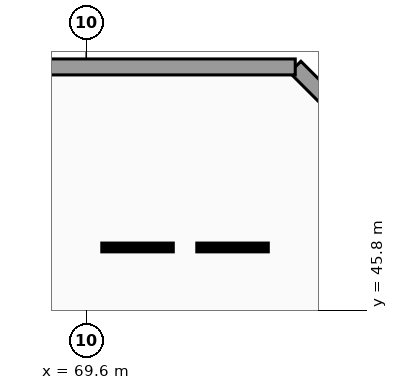
"""IFC4 building model, lengths in metres.
Left out: names, types, materials, properties, quantities, classifications, styles, units other than length and angle.
Written with IfcOpenShell. Run it as: python <this file> out.ifc"""

import sys

from ifc_helpers import new_model, si_unit, direction, frame, frame_2d, origin, place, context, subcontext, project, spatial, rectangle, extrude, element, save


model = new_model("IFC4")
c1 = context("Model", 3, precision=1e-05, world=origin(), true_north=direction((0.0, 1.0)))
c2 = subcontext(c1, "Body", "Model", "MODEL_VIEW")
j1 = project(units=[si_unit("LENGTHUNIT", "METRE"), si_unit("PLANEANGLEUNIT", "RADIAN")], contexts=[c1])
p1 = place(None, origin())
s1 = spatial("IfcSite", under=j1, at=p1, CompositionType="ELEMENT")
p2 = place(p1, origin())
s2 = spatial("IfcBuilding", under=s1, at=p2, CompositionType="ELEMENT")
p3 = place(p2, frame((0.0, 0.0, -4.08)))
s3 = spatial("IfcBuildingStorey", under=s2, at=p3, CompositionType="ELEMENT", Elevation=-4.08)
p4 = place(p3, frame((75.1, 52.2, 0.0), z_axis=(0.0, 0.0, 1.0), x_axis=(0.707106781187, -0.707106781187, 0.0)))
e1 = element("IfcWall", 1, at=p4, inside=s3, PredefinedType="SOLIDWALL", context=c2, shape_type="SweptSolid", body=[
    extrude(rectangle(XDim=5.94, YDim=0.42, at=frame_2d((2.97, 0.0))), origin(), (0.0, 0.0, 1.0), 3.76),
])
p5 = place(p3, frame((1.7, 52.2, 0.0), z_axis=(0.0, 0.0, 1.0), x_axis=(1.0, 0.0, 0.0)))
e2 = element("IfcWall", 2, at=p5, inside=s3, PredefinedType="SOLIDWALL", context=c2, shape_type="SweptSolid", body=[
    extrude(rectangle(XDim=73.4, YDim=0.42, at=frame_2d((36.7, 0.0))), origin(), (0.0, 0.0, 1.0), 3.76),
])
save(model, sys.argv[1])
